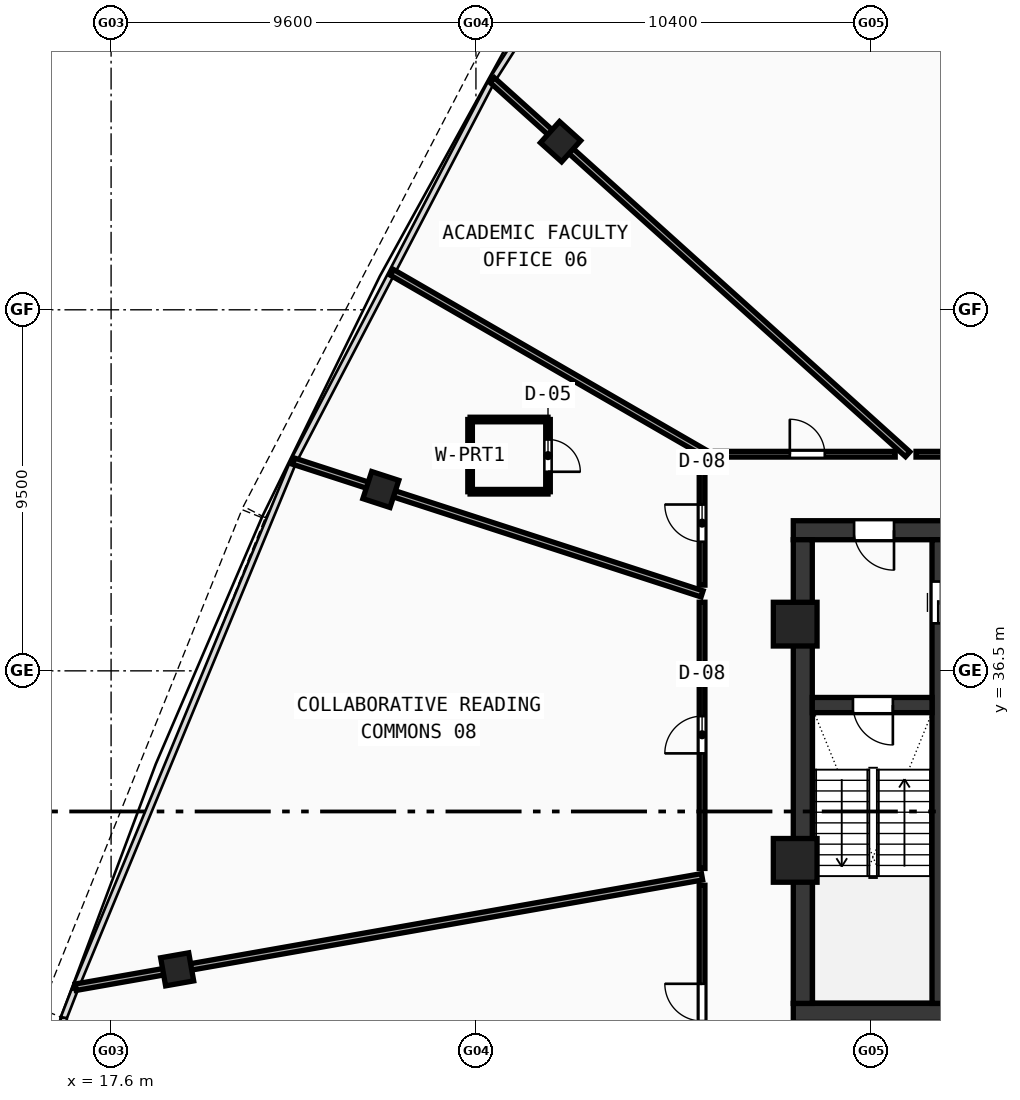
"""IFC4 building model, lengths in metres.
Left out: names, types, materials, properties, quantities, classifications, styles, units other than length and angle.
Written with IfcOpenShell. Run it as: python <this file> out.ifc"""

import sys

from ifc_helpers import new_model, si_unit, direction, frame, frame_2d, origin, origin_with_axes, origin_2d, place, context, subcontext, project, spatial, rectangle, hollow_rectangle, extrude, source, transform, mapped, element, fill, save


model = new_model("IFC4")
c1 = context("Model", 3, precision=1e-05, world=origin(), true_north=direction((0.0, 1.0)))
c2 = subcontext(c1, "Body", "Model", "MODEL_VIEW")
j1 = project(units=[si_unit("LENGTHUNIT", "METRE"), si_unit("PLANEANGLEUNIT", "RADIAN")], contexts=[c1])
p1 = place(None, origin())
s1 = spatial("IfcSite", under=j1, at=p1, CompositionType="ELEMENT")
p2 = place(p1, origin())
s2 = spatial("IfcBuilding", under=s1, at=p2, CompositionType="ELEMENT")
p3 = place(p2, frame((0.0, 0.0, 288.75)))
s3 = spatial("IfcBuildingStorey", under=s2, at=p3, CompositionType="ELEMENT", Elevation=288.75)
p4 = place(p3, frame((35.55, 27.5, 0.0), z_axis=(0.0, 0.0, 1.0), x_axis=(1.0, 0.0, 0.0)))
e1 = element("IfcWall", 1, at=p4, inside=s3, PredefinedType="SHEAR", context=c2, shape_type="SweptSolid", body=[
    extrude(rectangle(XDim=24.9, YDim=0.5, at=frame_2d((12.45, 0.0))), origin(), (0.0, 0.0, 1.0), 3.47),
])
p5 = place(p3, frame((35.55, 40.2, 0.0), z_axis=(0.0, 0.0, 1.0), x_axis=(1.0, 0.0, 0.0)))
e2 = element("IfcWall", 2, at=p5, inside=s3, PredefinedType="SHEAR", context=c2, shape_type="SweptSolid", body=[
    extrude(rectangle(XDim=11.25, YDim=0.5, at=frame_2d((5.625, 0.0))), origin(), (0.0, 0.0, 1.0), 3.47),
])
p6 = place(p5, frame((1.6, 0.0, 0.0)))
e3 = element("IfcOpeningElement", 3, at=p6, cuts=e2, PredefinedType="OPENING", context=c2, shape_type="SweptSolid", body=[
    extrude(rectangle(XDim=1.05, YDim=2.1, at=frame_2d((0.525, 1.05))), frame((0.0, 0.26, 0.0), z_axis=(0.0, -1.0, 0.0), x_axis=(1.0, 0.0, 0.0)), (0.0, 0.0, 1.0), 0.52),
])
p7 = place(p3, frame((35.8, 27.75, 0.0), z_axis=(0.0, 0.0, 1.0), x_axis=(0.0, 1.0, 0.0)))
e4 = element("IfcWall", 4, at=p7, inside=s3, PredefinedType="SHEAR", context=c2, shape_type="SweptSolid", body=[
    extrude(rectangle(XDim=12.2, YDim=0.5, at=frame_2d((6.1, 0.0))), origin(), (0.0, 0.0, 1.0), 3.47),
])
p8 = place(p3, frame((39.4, 27.75, 0.0), z_axis=(0.0, 0.0, 1.0), x_axis=(0.0, 1.0, 0.0)))
e5 = element("IfcWall", 5, at=p8, inside=s3, PredefinedType="SHEAR", context=c2, shape_type="SweptSolid", body=[
    extrude(rectangle(XDim=12.2, YDim=0.4, at=frame_2d((6.1, 0.0))), origin(), (0.0, 0.0, 1.0), 3.47),
])
p9 = place(p8, frame((10.0, 0.0, 0.0)))
e6 = element("IfcOpeningElement", 6, at=p9, cuts=e5, PredefinedType="OPENING", context=c2, shape_type="SweptSolid", body=[
    extrude(rectangle(XDim=1.1, YDim=2.1, at=frame_2d((0.55, 1.05))), frame((0.0, 0.21, 0.0), z_axis=(0.0, -1.0, 0.0), x_axis=(1.0, 0.0, 0.0)), (0.0, 0.0, 1.0), 0.42),
])
p10 = place(p3, frame((36.05, 35.6, 0.0), z_axis=(0.0, 0.0, 1.0), x_axis=(1.0, 0.0, 0.0)))
e7 = element("IfcWall", 7, at=p10, inside=s3, PredefinedType="SHEAR", context=c2, shape_type="SweptSolid", body=[
    extrude(rectangle(XDim=3.15, YDim=0.4, at=frame_2d((1.575, 0.0))), origin(), (0.0, 0.0, 1.0), 3.47),
])
p11 = place(p10, frame((1.07, 0.0, 0.0)))
e8 = element("IfcOpeningElement", 8, at=p11, cuts=e7, PredefinedType="OPENING", context=c2, shape_type="SweptSolid", body=[
    extrude(rectangle(XDim=1.05, YDim=2.1, at=frame_2d((0.525, 1.05))), frame((0.0, 0.21, 0.0), z_axis=(0.0, -1.0, 0.0), x_axis=(1.0, 0.0, 0.0)), (0.0, 0.0, 1.0), 0.42),
])
m1 = source(origin(), c2, "Body", "SweptSolid", [
    extrude(hollow_rectangle(XDim=1.15, YDim=1.15, WallThickness=0.048, at=origin_2d()), origin(), (0.0, 0.0, 1.0), 3.73),
])
for number, where, z_axis, x_axis in (
    (9, (35.6, 37.729, -0.26), (0.0, 0.0, 1.0), (1.0, 0.0, 0.0)),
    (10, (35.6, 31.513, -0.26), (0.0, 0.0, 1.0), (1.0, 0.0, 0.0)),
):
    element("IfcColumn", number, at=place(p3, frame(where, z_axis=z_axis, x_axis=x_axis)), inside=s3, PredefinedType="COLUMN", context=c2, shape_type="MappedRepresentation", body=[
        mapped(m1, transform((0.0, 0.0, 0.0), scale=1.0)),
    ])
m2 = source(origin(), c2, "Body", "SweptSolid", [
    extrude(hollow_rectangle(XDim=0.75, YDim=0.75, WallThickness=0.028, at=origin_2d()), origin(), (0.0, 0.0, 1.0), 3.73),
])
for number, where, z_axis, x_axis in (
    (11, (29.427, 50.424, -0.26), (0.0, 0.0, 1.0), (-0.669, -0.743, 0.0)),
    (12, (24.698, 41.271, -0.26), (0.0, 0.0, 1.0), (-0.309, -0.951, 0.0)),
    (13, (19.338, 28.646, -0.26), (0.0, 0.0, 1.0), (0.174, -0.985, 0.0)),
):
    element("IfcColumn", number, at=place(p3, frame(where, z_axis=z_axis, x_axis=x_axis)), inside=s3, PredefinedType="COLUMN", context=c2, shape_type="MappedRepresentation", body=[
        mapped(m2, transform((0.0, 0.0, 0.0), scale=1.0)),
    ])
p12 = place(p3, frame((38.56, 42.2, 0.0), z_axis=(0.0, 0.0, 1.0), x_axis=(-0.743145593795, 0.669129753055, 0.0)))
e14 = element("IfcWall", 14, at=p12, inside=s3, PredefinedType="PARTITIONING", context=c2, shape_type="SweptSolid", body=[
    extrude(rectangle(XDim=14.711, YDim=0.17, at=frame_2d((7.355, 0.0))), origin(), (0.0, 0.0, 1.0), 2.87),
])
p13 = place(p3, frame((33.278, 42.2, 0.0), z_axis=(0.0, 0.0, 1.0), x_axis=(-0.866033492747, 0.499985989244, 0.0)))
e15 = element("IfcWall", 15, at=p13, inside=s3, PredefinedType="PARTITIONING", context=c2, shape_type="SweptSolid", body=[
    extrude(rectangle(XDim=9.57, YDim=0.17, at=frame_2d((4.785, 0.0))), origin(), (0.0, 0.0, 1.0), 2.87),
])
p14 = place(p3, frame((33.15, 38.525, 0.0), z_axis=(0.0, 0.0, 1.0), x_axis=(-0.951060099206, 0.309005967092, 0.0)))
e16 = element("IfcWall", 16, at=p14, inside=s3, PredefinedType="PARTITIONING", context=c2, shape_type="SweptSolid", body=[
    extrude(rectangle(XDim=11.302, YDim=0.17, at=frame_2d((5.651, 0.0))), origin(), (0.0, 0.0, 1.0), 2.87),
])
p15 = place(p3, frame((33.15, 31.082, 0.0), z_axis=(0.0, 0.0, 1.0), x_axis=(-0.984806900178, -0.173653014261, 0.0)))
e17 = element("IfcWall", 17, at=p15, inside=s3, PredefinedType="PARTITIONING", context=c2, shape_type="SweptSolid", body=[
    extrude(rectangle(XDim=16.736, YDim=0.17, at=frame_2d((8.368, 0.0))), origin(), (0.0, 0.0, 1.0), 2.87),
])
p16 = place(p3, frame((33.15, 24.9, 0.0), z_axis=(0.0, 0.0, 1.0), x_axis=(0.0, 1.0, 0.0)))
e18 = element("IfcWall", 18, at=p16, inside=s3, PredefinedType="PARTITIONING", context=c2, shape_type="SweptSolid", body=[
    extrude(rectangle(XDim=5.958, YDim=0.15, at=frame_2d((2.979, 0.0))), origin(), (0.0, 0.0, 1.0), 3.12),
])
p17 = place(p16, frame((2.386, 0.0, 0.0)))
e19 = element("IfcOpeningElement", 19, at=p17, cuts=e18, PredefinedType="OPENING", context=c2, shape_type="SweptSolid", body=[
    extrude(rectangle(XDim=0.98, YDim=2.12, at=frame_2d((0.49, 1.06))), frame((0.0, 0.085, 0.0), z_axis=(0.0, -1.0, 0.0), x_axis=(1.0, 0.0, 0.0)), (0.0, 0.0, 1.0), 0.17),
])
p18 = place(p3, frame((33.15, 31.301, 0.0), z_axis=(0.0, 0.0, 1.0), x_axis=(0.0, 1.0, 0.0)))
e20 = element("IfcWall", 20, at=p18, inside=s3, PredefinedType="PARTITIONING", context=c2, shape_type="SweptSolid", body=[
    extrude(rectangle(XDim=7.004, YDim=0.15, at=frame_2d((3.502, 0.0))), origin(), (0.0, 0.0, 1.0), 3.47),
])
p19 = place(p18, frame((3.027, 0.0, 0.0)))
e21 = element("IfcOpeningElement", 21, at=p19, cuts=e20, PredefinedType="OPENING", context=c2, shape_type="SweptSolid", body=[
    extrude(rectangle(XDim=0.98, YDim=2.12, at=frame_2d((0.49, 1.06))), frame((0.0, 0.085, 0.0), z_axis=(0.0, -1.0, 0.0), x_axis=(1.0, 0.0, 0.0)), (0.0, 0.0, 1.0), 0.17),
])
p20 = place(p3, frame((33.15, 38.756, 0.0), z_axis=(0.0, 0.0, 1.0), x_axis=(0.0, 1.0, 0.0)))
e22 = element("IfcWall", 22, at=p20, inside=s3, PredefinedType="PARTITIONING", context=c2, shape_type="SweptSolid", body=[
    extrude(rectangle(XDim=3.263, YDim=0.15, at=frame_2d((1.632, 0.0))), origin(), (0.0, 0.0, 1.0), 3.12),
])
p21 = place(p20, frame((1.14, 0.0, 0.0)))
e23 = element("IfcOpeningElement", 23, at=p21, cuts=e22, PredefinedType="OPENING", context=c2, shape_type="SweptSolid", body=[
    extrude(rectangle(XDim=0.98, YDim=2.12, at=frame_2d((0.49, 1.06))), frame((0.0, 0.085, 0.0), z_axis=(0.0, -1.0, 0.0), x_axis=(1.0, 0.0, 0.0)), (0.0, 0.0, 1.0), 0.17),
])
p22 = place(p3, frame((33.497, 42.2, 0.0), z_axis=(0.0, 0.0, 1.0), x_axis=(1.0, 0.0, 0.0)))
e24 = element("IfcWall", 24, at=p22, inside=s3, PredefinedType="PARTITIONING", context=c2, shape_type="SweptSolid", body=[
    extrude(rectangle(XDim=4.734, YDim=0.15, at=frame_2d((2.367, 0.0))), origin(), (0.0, 0.0, 1.0), 3.12),
])
p23 = place(p22, frame((1.961, 0.0, 0.0)))
e25 = element("IfcOpeningElement", 25, at=p23, cuts=e24, PredefinedType="OPENING", context=c2, shape_type="SweptSolid", body=[
    extrude(rectangle(XDim=0.92, YDim=2.1, at=frame_2d((0.46, 1.05))), frame((0.0, 0.085, 0.0), z_axis=(0.0, -1.0, 0.0), x_axis=(1.0, 0.0, 0.0)), (0.0, 0.0, 1.0), 0.17),
])
p24 = place(p3, frame((38.78, 42.2, 0.0), z_axis=(0.0, 0.0, 1.0), x_axis=(1.0, 0.0, 0.0)))
e26 = element("IfcWall", 26, at=p24, inside=s3, PredefinedType="PARTITIONING", context=c2, shape_type="SweptSolid", body=[
    extrude(rectangle(XDim=2.801, YDim=0.15, at=frame_2d((1.4, 0.0))), origin(), (0.0, 0.0, 1.0), 2.87),
])
p25 = place(p3, frame((27.046, 41.213, 0.0), z_axis=(0.0, 0.0, 1.0), x_axis=(1.0, 0.0, 0.0)))
e27 = element("IfcWall", 27, at=p25, inside=s3, PredefinedType="PARTITIONING", context=c2, shape_type="SweptSolid", body=[
    extrude(rectangle(XDim=2.05, YDim=0.12, at=frame_2d((1.025, 0.0))), origin(), (0.0, 0.0, 1.0), 3.12),
])
p26 = place(p3, frame((29.096, 41.213, 0.0), z_axis=(0.0, 0.0, 1.0), x_axis=(0.0, 1.0, 0.0)))
e28 = element("IfcWall", 28, at=p26, inside=s3, PredefinedType="PARTITIONING", context=c2, shape_type="SweptSolid", body=[
    extrude(rectangle(XDim=1.9, YDim=0.12, at=frame_2d((0.95, 0.0))), origin(), (0.0, 0.0, 1.0), 3.12),
])
p27 = place(p26, frame((0.525, 0.0, 0.0)))
e29 = element("IfcOpeningElement", 29, at=p27, cuts=e28, PredefinedType="OPENING", context=c2, shape_type="SweptSolid", body=[
    extrude(rectangle(XDim=0.85, YDim=2.1, at=frame_2d((0.425, 1.05))), frame((0.0, 0.07, 0.0), z_axis=(0.0, -1.0, 0.0), x_axis=(1.0, 0.0, 0.0)), (0.0, 0.0, 1.0), 0.14),
])
p28 = place(p3, frame((29.096, 43.113, 0.0), z_axis=(0.0, 0.0, 1.0), x_axis=(-1.0, 0.0, 0.0)))
e30 = element("IfcWall", 30, at=p28, inside=s3, PredefinedType="PARTITIONING", context=c2, shape_type="SweptSolid", body=[
    extrude(rectangle(XDim=2.05, YDim=0.12, at=frame_2d((1.025, 0.0))), origin(), (0.0, 0.0, 1.0), 3.47),
])
p29 = place(p3, frame((27.046, 43.113, 0.0), z_axis=(0.0, 0.0, 1.0), x_axis=(0.0, -1.0, 0.0)))
e31 = element("IfcWall", 31, at=p29, inside=s3, PredefinedType="PARTITIONING", context=c2, shape_type="SweptSolid", body=[
    extrude(rectangle(XDim=1.9, YDim=0.12, at=frame_2d((0.95, 0.0))), origin(), (0.0, 0.0, 1.0), 3.47),
])
m3 = source(origin(), c2, "Body", "SweptSolid", [
    extrude(rectangle(XDim=1.05, YDim=2.1, at=frame_2d((0.525, 1.05))), frame((0.0, 0.025, 0.0), z_axis=(0.0, -1.0, 0.0), x_axis=(1.0, 0.0, 0.0)), (0.0, 0.0, 1.0), 0.05),
])
p30 = place(p11, frame((1.05, 0.0, 0.0), z_axis=(0.0, 0.0, 1.0), x_axis=(-1.0, 0.0, 0.0)))
e32 = element("IfcDoor", 32, at=p30, inside=s3, OperationType="SINGLE_SWING_LEFT", PredefinedType="DOOR", context=c2, shape_type="MappedRepresentation", body=[
    mapped(m3, transform((0.0, 0.0, 0.0), scale=1.0)),
])
fill(e8, e32)
p31 = place(p6, frame((1.05, 0.0, 0.0), z_axis=(0.0, 0.0, 1.0), x_axis=(-1.0, 0.0, 0.0)))
e33 = element("IfcDoor", 33, at=p31, inside=s3, OperationType="SINGLE_SWING_LEFT", PredefinedType="DOOR", context=c2, shape_type="MappedRepresentation", body=[
    mapped(m3, transform((0.0, 0.0, 0.0), scale=1.0)),
])
fill(e3, e33)
m4 = source(origin(), c2, "Body", "SweptSolid", [
    extrude(rectangle(XDim=1.1, YDim=2.1, at=frame_2d((0.55, 1.05))), frame((0.0, 0.025, 0.0), z_axis=(0.0, -1.0, 0.0), x_axis=(1.0, 0.0, 0.0)), (0.0, 0.0, 1.0), 0.05),
])
p32 = place(p9, frame((1.1, 0.0, 0.0), z_axis=(0.0, 0.0, 1.0), x_axis=(-1.0, 0.0, 0.0)))
e34 = element("IfcDoor", 34, at=p32, inside=s3, OperationType="DOUBLE_DOOR_SLIDING", PredefinedType="DOOR", context=c2, shape_type="MappedRepresentation", body=[
    mapped(m4, transform((0.0, 0.0, 0.0), scale=1.0)),
])
fill(e6, e34)
m5 = source(origin(), c2, "Body", "SweptSolid", [
    extrude(rectangle(XDim=0.92, YDim=2.1, at=frame_2d((0.46, 1.05))), frame((0.0, 0.025, 0.0), z_axis=(0.0, -1.0, 0.0), x_axis=(1.0, 0.0, 0.0)), (0.0, 0.0, 1.0), 0.05),
])
p33 = place(p23, origin_with_axes())
e35 = element("IfcDoor", 35, at=p33, inside=s3, OperationType="SINGLE_SWING_LEFT", PredefinedType="DOOR", context=c2, shape_type="MappedRepresentation", body=[
    mapped(m5, transform((0.0, 0.0, 0.0), scale=1.0)),
])
fill(e25, e35)
m6 = source(origin(), c2, "Body", "SweptSolid", [
    extrude(rectangle(XDim=0.98, YDim=2.12, at=frame_2d((0.49, 1.06))), frame((0.0, 0.025, 0.0), z_axis=(0.0, -1.0, 0.0), x_axis=(1.0, 0.0, 0.0)), (0.0, 0.0, 1.0), 0.05),
])
p34 = place(p21, origin_with_axes())
e36 = element("IfcDoor", 36, at=p34, inside=s3, OperationType="SINGLE_SWING_RIGHT", PredefinedType="DOOR", context=c2, shape_type="MappedRepresentation", body=[
    mapped(m6, transform((0.0, 0.0, 0.0), scale=1.0)),
])
fill(e23, e36)
m7 = source(origin(), c2, "Body", "SweptSolid", [
    extrude(rectangle(XDim=0.85, YDim=2.1, at=frame_2d((0.425, 1.05))), frame((0.0, 0.025, 0.0), z_axis=(0.0, -1.0, 0.0), x_axis=(1.0, 0.0, 0.0)), (0.0, 0.0, 1.0), 0.05),
])
p35 = place(p27, frame((0.85, 0.0, 0.0), z_axis=(0.0, 0.0, 1.0), x_axis=(-1.0, 0.0, 0.0)))
e37 = element("IfcDoor", 37, at=p35, inside=s3, OperationType="SINGLE_SWING_RIGHT", PredefinedType="DOOR", context=c2, shape_type="MappedRepresentation", body=[
    mapped(m7, transform((0.0, 0.0, 0.0), scale=1.0)),
])
fill(e29, e37)
p36 = place(p19, origin_with_axes())
e38 = element("IfcDoor", 38, at=p36, inside=s3, OperationType="SINGLE_SWING_LEFT", PredefinedType="DOOR", context=c2, shape_type="MappedRepresentation", body=[
    mapped(m6, transform((0.0, 0.0, 0.0), scale=1.0)),
])
fill(e21, e38)
p37 = place(p17, origin_with_axes())
e39 = element("IfcDoor", 39, at=p37, inside=s3, OperationType="SINGLE_SWING_RIGHT", PredefinedType="DOOR", context=c2, shape_type="MappedRepresentation", body=[
    mapped(m6, transform((0.0, 0.0, 0.0), scale=1.0)),
])
fill(e19, e39)
save(model, sys.argv[1])
